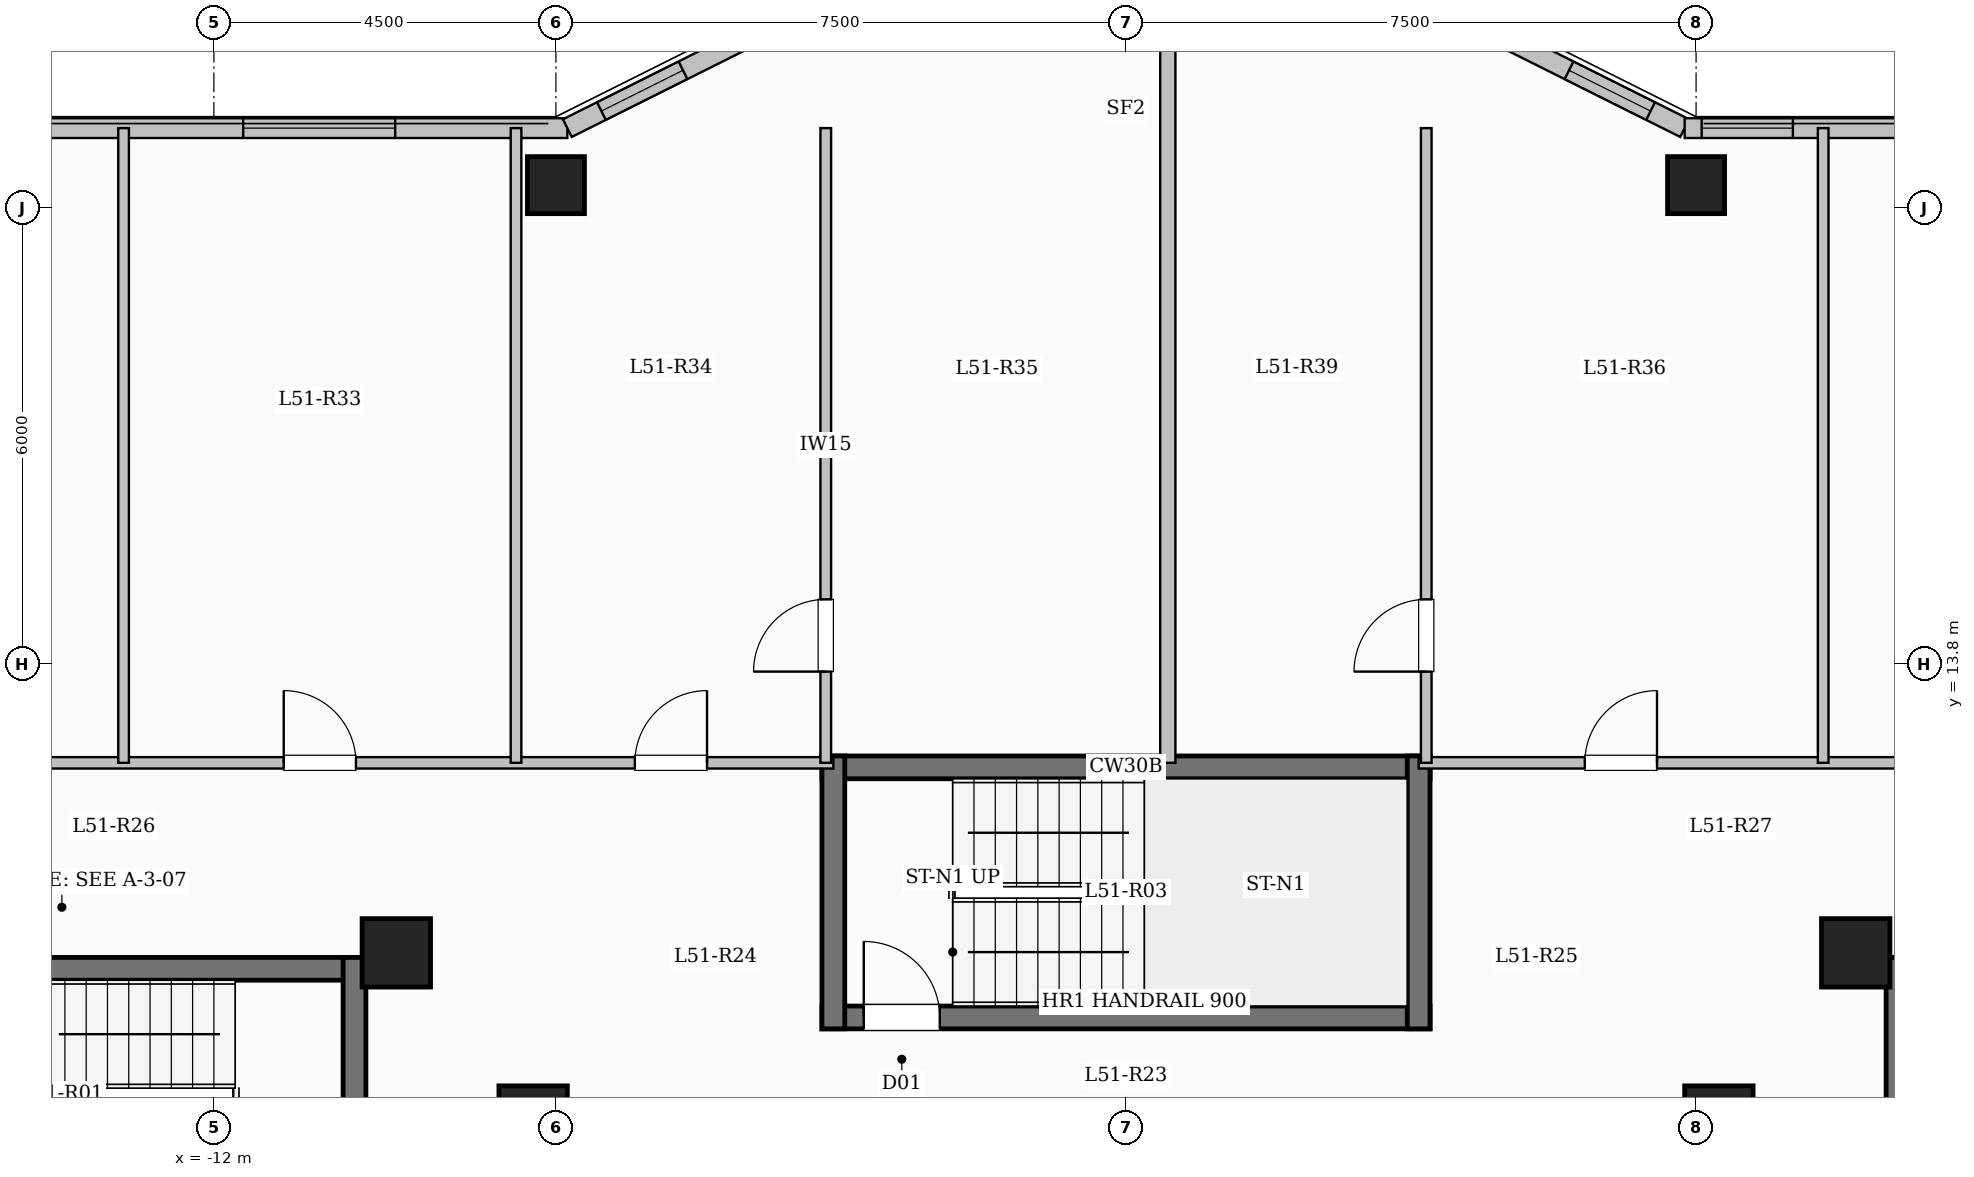
"""IFC4 building model, lengths in metres.
Left out: names, types, materials, properties, quantities, classifications, styles, units other than length and angle.
Written with IfcOpenShell. Run it as: python <this file> out.ifc"""

import sys

from ifc_helpers import new_model, si_unit, direction, frame, frame_2d, origin, origin_2d, place, context, subcontext, project, spatial, rectangle, extrude, element, fill, save


model = new_model("IFC4")
c1 = context("Model", 3, precision=1e-05, world=origin(), true_north=direction((0.0, 1.0)))
c2 = subcontext(c1, "Body", "Model", "MODEL_VIEW")
j1 = project(units=[si_unit("LENGTHUNIT", "METRE"), si_unit("PLANEANGLEUNIT", "RADIAN")], contexts=[c1])
p1 = place(None, origin())
s1 = spatial("IfcSite", under=j1, at=p1, CompositionType="ELEMENT")
p2 = place(p1, origin())
s2 = spatial("IfcBuilding", under=s1, at=p2, CompositionType="ELEMENT")
p3 = place(p2, frame((0.0, 0.0, 190.25)))
s3 = spatial("IfcBuildingStorey", under=s2, at=p3, CompositionType="ELEMENT", Elevation=190.25)
for number, where, z_axis, x_axis in (
    (1, (-7.8, 7.8, 0.0), (0.0, 0.0, 1.0), (1.0, 0.0, 0.0)),
    (2, (7.8, 7.8, 0.0), (0.0, 0.0, 1.0), (1.0, 0.0, 0.0)),
    (3, (-9.6, 10.0, 0.0), (0.0, 0.0, 1.0), (1.0, 0.0, 0.0)),
    (4, (9.6, 10.0, 0.0), (0.0, 0.0, 1.0), (1.0, 0.0, 0.0)),
):
    element("IfcColumn", number, at=place(p3, frame(where, z_axis=z_axis, x_axis=x_axis)), inside=s3, PredefinedType="COLUMN", context=c2, shape_type="SweptSolid", body=[
        extrude(rectangle(XDim=0.9, YDim=0.9, at=origin_2d()), origin(), (0.0, 0.0, 1.0), 3.35),
    ])
for number, where, z_axis, x_axis in (
    (5, (-7.5, 20.1, 0.0), (0.0, 0.0, 1.0), (1.0, 0.0, 0.0)),
    (6, (7.5, 20.1, 0.0), (0.0, 0.0, 1.0), (1.0, 0.0, 0.0)),
):
    element("IfcColumn", number, at=place(p3, frame(where, z_axis=z_axis, x_axis=x_axis)), inside=s3, PredefinedType="COLUMN", context=c2, shape_type="SweptSolid", body=[
        extrude(rectangle(XDim=0.75, YDim=0.75, at=origin_2d()), origin(), (0.0, 0.0, 1.0), 3.35),
    ])
p4 = place(p3, frame((-18.45, 20.85, 0.0), z_axis=(0.0, 0.0, 1.0), x_axis=(1.0, 0.0, 0.0)))
e7 = element("IfcWall", 7, at=p4, inside=s3, PredefinedType="SOLIDWALL", context=c2, shape_type="SweptSolid", body=[
    extrude(rectangle(XDim=11.1, YDim=0.26, at=frame_2d((5.55, 0.0))), origin(), (0.0, 0.0, 1.0), 3.1),
])
p5 = place(p4, frame((1.637, 0.0, 0.9)))
e8 = element("IfcOpeningElement", 8, at=p5, cuts=e7, PredefinedType="OPENING", context=c2, shape_type="SweptSolid", body=[
    extrude(rectangle(XDim=2.0, YDim=1.7, at=frame_2d((1.0, 0.85))), frame((0.0, 0.14, 0.0), z_axis=(0.0, -1.0, 0.0), x_axis=(1.0, 0.0, 0.0)), (0.0, 0.0, 1.0), 0.28),
])
p6 = place(p4, frame((6.835, 0.0, 0.9)))
e9 = element("IfcOpeningElement", 9, at=p6, cuts=e7, PredefinedType="OPENING", context=c2, shape_type="SweptSolid", body=[
    extrude(rectangle(XDim=2.0, YDim=1.7, at=frame_2d((1.0, 0.85))), frame((0.0, 0.14, 0.0), z_axis=(0.0, -1.0, 0.0), x_axis=(1.0, 0.0, 0.0)), (0.0, 0.0, 1.0), 0.28),
])
p7 = place(p3, frame((-7.35, 20.85, 0.0), z_axis=(0.0, 0.0, 1.0), x_axis=(0.894427191, 0.4472135955, 0.0)))
e10 = element("IfcWall", 10, at=p7, inside=s3, PredefinedType="SOLIDWALL", context=c2, shape_type="SweptSolid", body=[
    extrude(rectangle(XDim=3.354, YDim=0.26, at=frame_2d((1.677, 0.0))), origin(), (0.0, 0.0, 1.0), 3.1),
])
p8 = place(p7, frame((0.501, 0.0, 0.95)))
e11 = element("IfcOpeningElement", 11, at=p8, cuts=e10, PredefinedType="OPENING", context=c2, shape_type="SweptSolid", body=[
    extrude(rectangle(XDim=1.2, YDim=1.5, at=frame_2d((0.6, 0.75))), frame((0.0, 0.14, 0.0), z_axis=(0.0, -1.0, 0.0), x_axis=(1.0, 0.0, 0.0)), (0.0, 0.0, 1.0), 0.28),
])
p9 = place(p3, frame((4.35, 22.35, 0.0), z_axis=(0.0, 0.0, 1.0), x_axis=(0.894427191, -0.4472135955, 0.0)))
e12 = element("IfcWall", 12, at=p9, inside=s3, PredefinedType="SOLIDWALL", context=c2, shape_type="SweptSolid", body=[
    extrude(rectangle(XDim=3.354, YDim=0.26, at=frame_2d((1.677, 0.0))), origin(), (0.0, 0.0, 1.0), 3.1),
])
p10 = place(p9, frame((1.653, 0.0, 0.95)))
e13 = element("IfcOpeningElement", 13, at=p10, cuts=e12, PredefinedType="OPENING", context=c2, shape_type="SweptSolid", body=[
    extrude(rectangle(XDim=1.2, YDim=1.5, at=frame_2d((0.6, 0.75))), frame((0.0, 0.14, 0.0), z_axis=(0.0, -1.0, 0.0), x_axis=(1.0, 0.0, 0.0)), (0.0, 0.0, 1.0), 0.28),
])
p11 = place(p3, frame((7.35, 20.85, 0.0), z_axis=(0.0, 0.0, 1.0), x_axis=(1.0, 0.0, 0.0)))
e14 = element("IfcWall", 14, at=p11, inside=s3, PredefinedType="SOLIDWALL", context=c2, shape_type="SweptSolid", body=[
    extrude(rectangle(XDim=11.1, YDim=0.26, at=frame_2d((5.55, 0.0))), origin(), (0.0, 0.0, 1.0), 3.1),
])
p12 = place(p11, frame((0.223, 0.0, 0.95)))
e15 = element("IfcOpeningElement", 15, at=p12, cuts=e14, PredefinedType="OPENING", context=c2, shape_type="SweptSolid", body=[
    extrude(rectangle(XDim=1.2, YDim=1.5, at=frame_2d((0.6, 0.75))), frame((0.0, 0.14, 0.0), z_axis=(0.0, -1.0, 0.0), x_axis=(1.0, 0.0, 0.0)), (0.0, 0.0, 1.0), 0.28),
])
p13 = place(p11, frame((3.42, 0.0, 0.9)))
e16 = element("IfcOpeningElement", 16, at=p13, cuts=e14, PredefinedType="OPENING", context=c2, shape_type="SweptSolid", body=[
    extrude(rectangle(XDim=2.0, YDim=1.7, at=frame_2d((1.0, 0.85))), frame((0.0, 0.14, 0.0), z_axis=(0.0, -1.0, 0.0), x_axis=(1.0, 0.0, 0.0)), (0.0, 0.0, 1.0), 0.28),
])
p14 = place(p11, frame((8.041, 0.0, 0.9)))
e17 = element("IfcOpeningElement", 17, at=p14, cuts=e14, PredefinedType="OPENING", context=c2, shape_type="SweptSolid", body=[
    extrude(rectangle(XDim=2.0, YDim=1.7, at=frame_2d((1.0, 0.85))), frame((0.0, 0.14, 0.0), z_axis=(0.0, -1.0, 0.0), x_axis=(1.0, 0.0, 0.0)), (0.0, 0.0, 1.0), 0.28),
])
p15 = place(p3, frame((-18.0, 9.79, 0.0), z_axis=(0.0, 0.0, 1.0), x_axis=(1.0, 0.0, 0.0)))
e18 = element("IfcWall", 18, at=p15, inside=s3, PredefinedType="SHEAR", context=c2, shape_type="SweptSolid", body=[
    extrude(rectangle(XDim=8.0, YDim=0.3, at=frame_2d((4.0, 0.0))), origin(), (0.0, 0.0, 1.0), 3.35),
])
p16 = place(p3, frame((-10.15, 6.35, 0.0), z_axis=(0.0, 0.0, 1.0), x_axis=(0.0, 1.0, 0.0)))
e19 = element("IfcWall", 19, at=p16, inside=s3, PredefinedType="SHEAR", context=c2, shape_type="SweptSolid", body=[
    extrude(rectangle(XDim=3.59, YDim=0.3, at=frame_2d((1.795, 0.0))), origin(), (0.0, 0.0, 1.0), 3.35),
])
p17 = place(p3, frame((10.0, 9.79, 0.0), z_axis=(0.0, 0.0, 1.0), x_axis=(1.0, 0.0, 0.0)))
e20 = element("IfcWall", 20, at=p17, inside=s3, PredefinedType="SHEAR", context=c2, shape_type="SweptSolid", body=[
    extrude(rectangle(XDim=8.0, YDim=0.3, at=frame_2d((4.0, 0.0))), origin(), (0.0, 0.0, 1.0), 3.35),
])
p18 = place(p3, frame((10.15, 6.35, 0.0), z_axis=(0.0, 0.0, 1.0), x_axis=(0.0, 1.0, 0.0)))
e21 = element("IfcWall", 21, at=p18, inside=s3, PredefinedType="SHEAR", context=c2, shape_type="SweptSolid", body=[
    extrude(rectangle(XDim=3.59, YDim=0.3, at=frame_2d((1.795, 0.0))), origin(), (0.0, 0.0, 1.0), 3.35),
])
p19 = place(p3, frame((-4.0, 12.44, 0.0), z_axis=(0.0, 0.0, 1.0), x_axis=(1.0, 0.0, 0.0)))
e22 = element("IfcWall", 22, at=p19, inside=s3, PredefinedType="SHEAR", context=c2, shape_type="SweptSolid", body=[
    extrude(rectangle(XDim=8.0, YDim=0.3, at=frame_2d((4.0, 0.0))), origin(), (0.0, 0.0, 1.0), 3.35),
])
p20 = place(p3, frame((-4.0, 9.15, 0.0), z_axis=(0.0, 0.0, 1.0), x_axis=(1.0, 0.0, 0.0)))
e23 = element("IfcWall", 23, at=p20, inside=s3, PredefinedType="SHEAR", context=c2, shape_type="SweptSolid", body=[
    extrude(rectangle(XDim=8.0, YDim=0.3, at=frame_2d((4.0, 0.0))), origin(), (0.0, 0.0, 1.0), 3.35),
])
p21 = place(p20, frame((0.55, 0.0, 0.0)))
e24 = element("IfcOpeningElement", 24, at=p21, cuts=e23, PredefinedType="OPENING", context=c2, shape_type="SweptSolid", body=[
    extrude(rectangle(XDim=1.0, YDim=2.15, at=frame_2d((0.5, 1.075))), frame((0.0, 0.16, 0.0), z_axis=(0.0, -1.0, 0.0), x_axis=(1.0, 0.0, 0.0)), (0.0, 0.0, 1.0), 0.32),
])
for number, where, z_axis, x_axis in (
    (25, (-3.85, 9.0, 0.0), (0.0, 0.0, 1.0), (0.0, 1.0, 0.0)),
    (26, (3.85, 9.0, 0.0), (0.0, 0.0, 1.0), (0.0, 1.0, 0.0)),
):
    element("IfcWall", number, at=place(p3, frame(where, z_axis=z_axis, x_axis=x_axis)), inside=s3, PredefinedType="SHEAR", context=c2, shape_type="SweptSolid", body=[
        extrude(rectangle(XDim=3.59, YDim=0.3, at=frame_2d((1.795, 0.0))), origin(), (0.0, 0.0, 1.0), 3.35),
    ])
p22 = place(p3, frame((-18.35, 12.5, 0.0), z_axis=(0.0, 0.0, 1.0), x_axis=(1.0, 0.0, 0.0)))
e27 = element("IfcWall", 27, at=p22, inside=s3, PredefinedType="PARTITIONING", context=c2, shape_type="SweptSolid", body=[
    extrude(rectangle(XDim=14.5, YDim=0.15, at=frame_2d((7.25, 0.0))), origin(), (0.0, 0.0, 1.0), 3.1),
])
p23 = place(p22, frame((2.076, 0.0, 0.0)))
e28 = element("IfcOpeningElement", 28, at=p23, cuts=e27, PredefinedType="OPENING", context=c2, shape_type="SweptSolid", body=[
    extrude(rectangle(XDim=0.95, YDim=2.15, at=frame_2d((0.475, 1.075))), frame((0.0, 0.085, 0.0), z_axis=(0.0, -1.0, 0.0), x_axis=(1.0, 0.0, 0.0)), (0.0, 0.0, 1.0), 0.17),
])
p24 = place(p22, frame((7.269, 0.0, 0.0)))
e29 = element("IfcOpeningElement", 29, at=p24, cuts=e27, PredefinedType="OPENING", context=c2, shape_type="SweptSolid", body=[
    extrude(rectangle(XDim=0.95, YDim=2.15, at=frame_2d((0.475, 1.075))), frame((0.0, 0.085, 0.0), z_axis=(0.0, -1.0, 0.0), x_axis=(1.0, 0.0, 0.0)), (0.0, 0.0, 1.0), 0.17),
])
p25 = place(p22, frame((11.888, 0.0, 0.0)))
e30 = element("IfcOpeningElement", 30, at=p25, cuts=e27, PredefinedType="OPENING", context=c2, shape_type="SweptSolid", body=[
    extrude(rectangle(XDim=0.95, YDim=2.15, at=frame_2d((0.475, 1.075))), frame((0.0, 0.085, 0.0), z_axis=(0.0, -1.0, 0.0), x_axis=(1.0, 0.0, 0.0)), (0.0, 0.0, 1.0), 0.17),
])
p26 = place(p3, frame((3.85, 12.5, 0.0), z_axis=(0.0, 0.0, 1.0), x_axis=(1.0, 0.0, 0.0)))
e31 = element("IfcWall", 31, at=p26, inside=s3, PredefinedType="PARTITIONING", context=c2, shape_type="SweptSolid", body=[
    extrude(rectangle(XDim=14.5, YDim=0.15, at=frame_2d((7.25, 0.0))), origin(), (0.0, 0.0, 1.0), 3.1),
])
p27 = place(p26, frame((2.186, 0.0, 0.0)))
e32 = element("IfcOpeningElement", 32, at=p27, cuts=e31, PredefinedType="OPENING", context=c2, shape_type="SweptSolid", body=[
    extrude(rectangle(XDim=0.95, YDim=2.15, at=frame_2d((0.475, 1.075))), frame((0.0, 0.085, 0.0), z_axis=(0.0, -1.0, 0.0), x_axis=(1.0, 0.0, 0.0)), (0.0, 0.0, 1.0), 0.17),
])
p28 = place(p26, frame((7.379, 0.0, 0.0)))
e33 = element("IfcOpeningElement", 33, at=p28, cuts=e31, PredefinedType="OPENING", context=c2, shape_type="SweptSolid", body=[
    extrude(rectangle(XDim=0.95, YDim=2.15, at=frame_2d((0.475, 1.075))), frame((0.0, 0.085, 0.0), z_axis=(0.0, -1.0, 0.0), x_axis=(1.0, 0.0, 0.0)), (0.0, 0.0, 1.0), 0.17),
])
p29 = place(p26, frame((11.998, 0.0, 0.0)))
e34 = element("IfcOpeningElement", 34, at=p29, cuts=e31, PredefinedType="OPENING", context=c2, shape_type="SweptSolid", body=[
    extrude(rectangle(XDim=0.95, YDim=2.15, at=frame_2d((0.475, 1.075))), frame((0.0, 0.085, 0.0), z_axis=(0.0, -1.0, 0.0), x_axis=(1.0, 0.0, 0.0)), (0.0, 0.0, 1.0), 0.17),
])
p30 = place(p3, frame((0.55, 12.5, 0.0), z_axis=(0.0, 0.0, 1.0), x_axis=(0.0, 1.0, 0.0)))
e35 = element("IfcWall", 35, at=p30, inside=s3, PredefinedType="SOLIDWALL", context=c2, shape_type="SweptSolid", body=[
    extrude(rectangle(XDim=9.88, YDim=0.2, at=frame_2d((4.94, 0.0))), origin(), (0.0, 0.0, 1.0), 3.1),
])
p31 = place(p3, frame((-3.95, 12.5, 0.0), z_axis=(0.0, 0.0, 1.0), x_axis=(0.0, 1.0, 0.0)))
e36 = element("IfcWall", 36, at=p31, inside=s3, PredefinedType="PARTITIONING", context=c2, shape_type="SweptSolid", body=[
    extrude(rectangle(XDim=8.35, YDim=0.14, at=frame_2d((4.175, 0.0))), origin(), (0.0, 0.0, 1.0), 3.1),
])
p32 = place(p31, frame((1.2, 0.0, 0.0)))
e37 = element("IfcOpeningElement", 37, at=p32, cuts=e36, PredefinedType="OPENING", context=c2, shape_type="SweptSolid", body=[
    extrude(rectangle(XDim=0.95, YDim=2.15, at=frame_2d((0.475, 1.075))), frame((0.0, 0.08, 0.0), z_axis=(0.0, -1.0, 0.0), x_axis=(1.0, 0.0, 0.0)), (0.0, 0.0, 1.0), 0.16),
])
p33 = place(p3, frame((-13.188, 12.5, 0.0), z_axis=(0.0, 0.0, 1.0), x_axis=(0.0, 1.0, 0.0)))
e38 = element("IfcWall", 38, at=p33, inside=s3, PredefinedType="PARTITIONING", context=c2, shape_type="SweptSolid", body=[
    extrude(rectangle(XDim=8.35, YDim=0.14, at=frame_2d((4.175, 0.0))), origin(), (0.0, 0.0, 1.0), 3.1),
])
p34 = place(p3, frame((-8.025, 12.5, 0.0), z_axis=(0.0, 0.0, 1.0), x_axis=(0.0, 1.0, 0.0)))
e39 = element("IfcWall", 39, at=p34, inside=s3, PredefinedType="PARTITIONING", context=c2, shape_type="SweptSolid", body=[
    extrude(rectangle(XDim=8.35, YDim=0.14, at=frame_2d((4.175, 0.0))), origin(), (0.0, 0.0, 1.0), 2.585),
])
p35 = place(p3, frame((3.95, 12.5, 0.0), z_axis=(0.0, 0.0, 1.0), x_axis=(0.0, 1.0, 0.0)))
e40 = element("IfcWall", 40, at=p35, inside=s3, PredefinedType="PARTITIONING", context=c2, shape_type="SweptSolid", body=[
    extrude(rectangle(XDim=8.35, YDim=0.14, at=frame_2d((4.175, 0.0))), origin(), (0.0, 0.0, 1.0), 3.1),
])
p36 = place(p35, frame((1.2, 0.0, 0.0)))
e41 = element("IfcOpeningElement", 41, at=p36, cuts=e40, PredefinedType="OPENING", context=c2, shape_type="SweptSolid", body=[
    extrude(rectangle(XDim=0.95, YDim=2.15, at=frame_2d((0.475, 1.075))), frame((0.0, 0.08, 0.0), z_axis=(0.0, -1.0, 0.0), x_axis=(1.0, 0.0, 0.0)), (0.0, 0.0, 1.0), 0.16),
])
p37 = place(p3, frame((9.172, 12.5, 0.0), z_axis=(0.0, 0.0, 1.0), x_axis=(0.0, 1.0, 0.0)))
e42 = element("IfcWall", 42, at=p37, inside=s3, PredefinedType="PARTITIONING", context=c2, shape_type="SweptSolid", body=[
    extrude(rectangle(XDim=8.35, YDim=0.14, at=frame_2d((4.175, 0.0))), origin(), (0.0, 0.0, 1.0), 3.1),
])
p38 = place(p6, origin())
e43 = element("IfcWindow", 43, at=p38, inside=s3, PartitioningType="SINGLE_PANEL", PredefinedType="WINDOW", context=c2, shape_type="SweptSolid", body=[
    extrude(rectangle(XDim=2.0, YDim=1.7, at=frame_2d((1.0, 0.85))), frame((0.0, 0.03, 0.0), z_axis=(0.0, -1.0, 0.0), x_axis=(1.0, 0.0, 0.0)), (0.0, 0.0, 1.0), 0.06),
])
fill(e9, e43)
p39 = place(p8, origin())
e44 = element("IfcWindow", 44, at=p39, inside=s3, PartitioningType="SINGLE_PANEL", PredefinedType="WINDOW", context=c2, shape_type="SweptSolid", body=[
    extrude(rectangle(XDim=1.2, YDim=1.5, at=frame_2d((0.6, 0.75))), frame((0.0, 0.03, 0.0), z_axis=(0.0, -1.0, 0.0), x_axis=(1.0, 0.0, 0.0)), (0.0, 0.0, 1.0), 0.06),
])
fill(e11, e44)
p40 = place(p10, origin())
e45 = element("IfcWindow", 45, at=p40, inside=s3, PartitioningType="SINGLE_PANEL", PredefinedType="WINDOW", context=c2, shape_type="SweptSolid", body=[
    extrude(rectangle(XDim=1.2, YDim=1.5, at=frame_2d((0.6, 0.75))), frame((0.0, 0.03, 0.0), z_axis=(0.0, -1.0, 0.0), x_axis=(1.0, 0.0, 0.0)), (0.0, 0.0, 1.0), 0.06),
])
fill(e13, e45)
p41 = place(p12, origin())
e46 = element("IfcWindow", 46, at=p41, inside=s3, PartitioningType="SINGLE_PANEL", PredefinedType="WINDOW", context=c2, shape_type="SweptSolid", body=[
    extrude(rectangle(XDim=1.2, YDim=1.5, at=frame_2d((0.6, 0.75))), frame((0.0, 0.03, 0.0), z_axis=(0.0, -1.0, 0.0), x_axis=(1.0, 0.0, 0.0)), (0.0, 0.0, 1.0), 0.06),
])
fill(e15, e46)
p42 = place(p21, origin())
e47 = element("IfcDoor", 47, at=p42, inside=s3, OperationType="SINGLE_SWING_LEFT", PredefinedType="DOOR", context=c2, shape_type="SweptSolid", body=[
    extrude(rectangle(XDim=1.0, YDim=2.15, at=frame_2d((0.5, 1.075))), frame((0.0, 0.025, 0.0), z_axis=(0.0, -1.0, 0.0), x_axis=(1.0, 0.0, 0.0)), (0.0, 0.0, 1.0), 0.05),
])
fill(e24, e47)
p43 = place(p24, origin())
e48 = element("IfcDoor", 48, at=p43, inside=s3, OperationType="SINGLE_SWING_LEFT", PredefinedType="DOOR", context=c2, shape_type="SweptSolid", body=[
    extrude(rectangle(XDim=0.95, YDim=2.15, at=frame_2d((0.475, 1.075))), frame((0.0, 0.025, 0.0), z_axis=(0.0, -1.0, 0.0), x_axis=(1.0, 0.0, 0.0)), (0.0, 0.0, 1.0), 0.05),
])
fill(e29, e48)
p44 = place(p25, origin())
e49 = element("IfcDoor", 49, at=p44, inside=s3, OperationType="SINGLE_SWING_RIGHT", PredefinedType="DOOR", context=c2, shape_type="SweptSolid", body=[
    extrude(rectangle(XDim=0.95, YDim=2.15, at=frame_2d((0.475, 1.075))), frame((0.0, 0.025, 0.0), z_axis=(0.0, -1.0, 0.0), x_axis=(1.0, 0.0, 0.0)), (0.0, 0.0, 1.0), 0.05),
])
fill(e30, e49)
p45 = place(p32, origin())
e50 = element("IfcDoor", 50, at=p45, inside=s3, OperationType="SINGLE_SWING_LEFT", PredefinedType="DOOR", context=c2, shape_type="SweptSolid", body=[
    extrude(rectangle(XDim=0.95, YDim=2.15, at=frame_2d((0.475, 1.075))), frame((0.0, 0.025, 0.0), z_axis=(0.0, -1.0, 0.0), x_axis=(1.0, 0.0, 0.0)), (0.0, 0.0, 1.0), 0.05),
])
fill(e37, e50)
p46 = place(p27, origin())
e51 = element("IfcDoor", 51, at=p46, inside=s3, OperationType="SINGLE_SWING_RIGHT", PredefinedType="DOOR", context=c2, shape_type="SweptSolid", body=[
    extrude(rectangle(XDim=0.95, YDim=2.15, at=frame_2d((0.475, 1.075))), frame((0.0, 0.025, 0.0), z_axis=(0.0, -1.0, 0.0), x_axis=(1.0, 0.0, 0.0)), (0.0, 0.0, 1.0), 0.05),
])
fill(e32, e51)
p47 = place(p36, origin())
e52 = element("IfcDoor", 52, at=p47, inside=s3, OperationType="SINGLE_SWING_LEFT", PredefinedType="DOOR", context=c2, shape_type="SweptSolid", body=[
    extrude(rectangle(XDim=0.95, YDim=2.15, at=frame_2d((0.475, 1.075))), frame((0.0, 0.025, 0.0), z_axis=(0.0, -1.0, 0.0), x_axis=(1.0, 0.0, 0.0)), (0.0, 0.0, 1.0), 0.05),
])
fill(e41, e52)
save(model, sys.argv[1])
